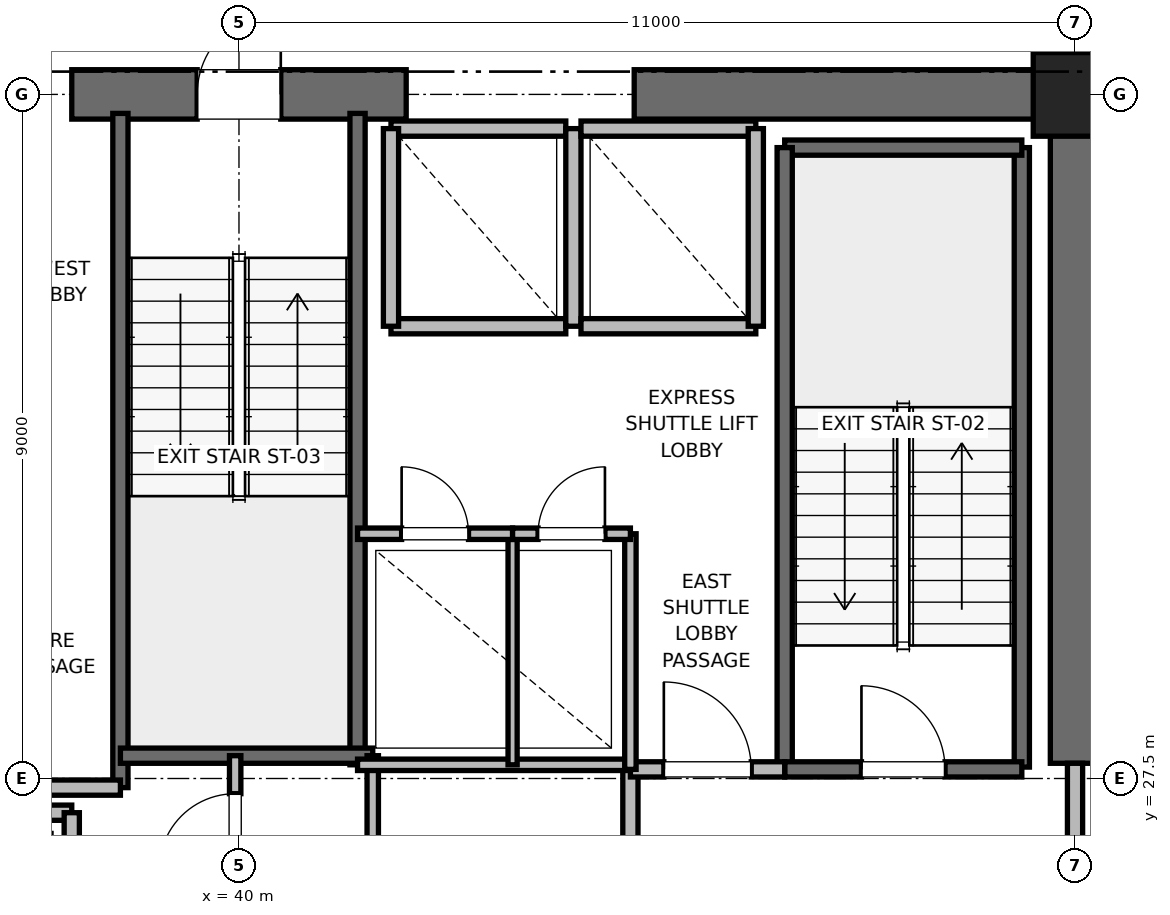
"""IFC4 building model, lengths in metres.
Left out: names, types, materials, properties, quantities, classifications, styles, units other than length and angle.
Written with IfcOpenShell. Run it as: python <this file> out.ifc"""

import sys

from ifc_helpers import new_model, si_unit, direction, frame, frame_2d, origin, origin_2d, place, context, subcontext, project, spatial, rectangle, extrude, element, fill, save


model = new_model("IFC4")
c1 = context("Model", 3, precision=1e-05, world=origin(), true_north=direction((0.0, 1.0)))
c2 = subcontext(c1, "Body", "Model", "MODEL_VIEW")
j1 = project(units=[si_unit("LENGTHUNIT", "METRE"), si_unit("PLANEANGLEUNIT", "RADIAN")], contexts=[c1])
p1 = place(None, origin())
s1 = spatial("IfcSite", under=j1, at=p1, CompositionType="ELEMENT")
p2 = place(p1, origin())
s2 = spatial("IfcBuilding", under=s1, at=p2, CompositionType="ELEMENT")
p3 = place(p2, frame((0.0, 0.0, 27.6)))
s3 = spatial("IfcBuildingStorey", under=s2, at=p3, CompositionType="ELEMENT", Elevation=27.6)
p4 = place(p3, frame((51.0, 36.5, 0.0), z_axis=(0.0, 0.0, 1.0), x_axis=(1.0, 0.0, 0.0)))
e1 = element("IfcColumn", 1, at=p4, inside=s3, PredefinedType="PILASTER", context=c2, shape_type="SweptSolid", body=[
    extrude(rectangle(XDim=1.1, YDim=1.1, at=origin_2d()), origin(), (0.0, 0.0, 1.0), 4.0),
])
p5 = place(p3, frame((37.8, 36.5, 0.0), z_axis=(0.0, 0.0, 1.0), x_axis=(1.0, 0.0, 0.0)))
e2 = element("IfcWall", 2, at=p5, inside=s3, PredefinedType="SHEAR", context=c2, shape_type="SweptSolid", body=[
    extrude(rectangle(XDim=4.4, YDim=0.65, at=frame_2d((2.2, 0.0))), origin(), (0.0, 0.0, 1.0), 3.76),
])
p6 = place(p5, frame((1.65, 0.0, 0.0)))
e3 = element("IfcOpeningElement", 3, at=p6, cuts=e2, PredefinedType="OPENING", context=c2, shape_type="SweptSolid", body=[
    extrude(rectangle(XDim=1.1, YDim=2.15, at=frame_2d((0.55, 1.075))), frame((0.0, 0.325, 0.0), z_axis=(0.0, -1.0, 0.0), x_axis=(1.0, 0.0, 0.0)), (0.0, 0.0, 1.0), 0.65),
])
p7 = place(p3, frame((45.2, 36.5, 0.0), z_axis=(0.0, 0.0, 1.0), x_axis=(1.0, 0.0, 0.0)))
e4 = element("IfcWall", 4, at=p7, inside=s3, PredefinedType="SHEAR", context=c2, shape_type="SweptSolid", body=[
    extrude(rectangle(XDim=5.8, YDim=0.65, at=frame_2d((2.9, 0.0))), origin(), (0.0, 0.0, 1.0), 3.76),
])
p8 = place(p3, frame((51.0, 27.7, 0.0), z_axis=(0.0, 0.0, 1.0), x_axis=(0.0, 1.0, 0.0)))
e5 = element("IfcWall", 5, at=p8, inside=s3, PredefinedType="SHEAR", context=c2, shape_type="SweptSolid", body=[
    extrude(rectangle(XDim=8.8, YDim=0.65, at=frame_2d((4.4, 0.0))), origin(), (0.0, 0.0, 1.0), 3.76),
])
p9 = place(p3, frame((50.3, 27.65, 0.0), z_axis=(0.0, 0.0, 1.0), x_axis=(0.0, 1.0, 0.0)))
e6 = element("IfcWall", 6, at=p9, inside=s3, PredefinedType="SOLIDWALL", context=c2, shape_type="SweptSolid", body=[
    extrude(rectangle(XDim=8.15, YDim=0.2, at=frame_2d((4.075, 0.0))), origin(), (0.0, 0.0, 1.0), 3.76),
])
p10 = place(p3, frame((47.18, 35.8, 0.0), z_axis=(0.0, 0.0, 1.0), x_axis=(1.0, 0.0, 0.0)))
e7 = element("IfcWall", 7, at=p10, inside=s3, PredefinedType="SOLIDWALL", context=c2, shape_type="SweptSolid", body=[
    extrude(rectangle(XDim=3.12, YDim=0.2, at=frame_2d((1.56, 0.0))), origin(), (0.0, 0.0, 1.0), 3.76),
])
p11 = place(p3, frame((47.18, 27.62, 0.0), z_axis=(0.0, 0.0, 1.0), x_axis=(0.0, 1.0, 0.0)))
e8 = element("IfcWall", 8, at=p11, inside=s3, PredefinedType="SOLIDWALL", context=c2, shape_type="SweptSolid", body=[
    extrude(rectangle(XDim=8.18, YDim=0.2, at=frame_2d((4.09, 0.0))), origin(), (0.0, 0.0, 1.0), 3.76),
])
p12 = place(p3, frame((47.18, 27.62, 0.0), z_axis=(0.0, 0.0, 1.0), x_axis=(1.0, 0.0, 0.0)))
e9 = element("IfcWall", 9, at=p12, inside=s3, PredefinedType="SOLIDWALL", context=c2, shape_type="SweptSolid", body=[
    extrude(rectangle(XDim=3.12, YDim=0.2, at=frame_2d((1.56, 0.0))), origin(), (0.0, 0.0, 1.0), 3.76),
])
p13 = place(p12, frame((1.01, 0.0, 0.0)))
e10 = element("IfcOpeningElement", 10, at=p13, cuts=e9, PredefinedType="OPENING", context=c2, shape_type="SweptSolid", body=[
    extrude(rectangle(XDim=1.1, YDim=2.15, at=frame_2d((0.55, 1.075))), frame((0.0, 0.1, 0.0), z_axis=(0.0, -1.0, 0.0), x_axis=(1.0, 0.0, 0.0)), (0.0, 0.0, 1.0), 0.2),
])
p14 = place(p3, frame((38.44, 27.38, 0.0), z_axis=(0.0, 0.0, 1.0), x_axis=(0.0, 1.0, 0.0)))
e11 = element("IfcWall", 11, at=p14, inside=s3, PredefinedType="SOLIDWALL", context=c2, shape_type="SweptSolid", body=[
    extrude(rectangle(XDim=8.87, YDim=0.2, at=frame_2d((4.435, 0.0))), origin(), (0.0, 0.0, 1.0), 3.76),
])
p15 = place(p3, frame((41.56, 27.68, 0.0), z_axis=(0.0, 0.0, 1.0), x_axis=(0.0, 1.0, 0.0)))
e12 = element("IfcWall", 12, at=p15, inside=s3, PredefinedType="SOLIDWALL", context=c2, shape_type="SweptSolid", body=[
    extrude(rectangle(XDim=8.57, YDim=0.2, at=frame_2d((4.285, 0.0))), origin(), (0.0, 0.0, 1.0), 3.76),
])
p16 = place(p3, frame((38.44, 27.8, 0.0), z_axis=(0.0, 0.0, 1.0), x_axis=(1.0, 0.0, 0.0)))
e13 = element("IfcWall", 13, at=p16, inside=s3, PredefinedType="SOLIDWALL", context=c2, shape_type="SweptSolid", body=[
    extrude(rectangle(XDim=3.32, YDim=0.2, at=frame_2d((1.66, 0.0))), origin(), (0.0, 0.0, 1.0), 3.76),
])
p17 = place(p3, frame((32.82, 27.38, 0.0), z_axis=(0.0, 0.0, 1.0), x_axis=(1.0, 0.0, 0.0)))
e14 = element("IfcWall", 14, at=p17, inside=s3, PredefinedType="PARTITIONING", context=c2, shape_type="SweptSolid", body=[
    extrude(rectangle(XDim=5.62, YDim=0.2, at=frame_2d((2.81, 0.0))), origin(), (0.0, 0.0, 1.0), 3.76),
])
p18 = place(p3, frame((45.15, 24.25, 0.0), z_axis=(0.0, 0.0, 1.0), x_axis=(0.0, 1.0, 0.0)))
e15 = element("IfcWall", 15, at=p18, inside=s3, PredefinedType="PARTITIONING", context=c2, shape_type="SweptSolid", body=[
    extrude(rectangle(XDim=3.37, YDim=0.2, at=frame_2d((1.685, 0.0))), origin(), (0.0, 0.0, 1.0), 3.76),
])
p19 = place(p3, frame((45.15, 27.62, 0.0), z_axis=(0.0, 0.0, 1.0), x_axis=(1.0, 0.0, 0.0)))
e16 = element("IfcWall", 16, at=p19, inside=s3, PredefinedType="PARTITIONING", context=c2, shape_type="SweptSolid", body=[
    extrude(rectangle(XDim=2.03, YDim=0.2, at=frame_2d((1.015, 0.0))), origin(), (0.0, 0.0, 1.0), 3.76),
])
p20 = place(p19, frame((0.44, 0.0, 0.0)))
e17 = element("IfcOpeningElement", 17, at=p20, cuts=e16, PredefinedType="OPENING", context=c2, shape_type="SweptSolid", body=[
    extrude(rectangle(XDim=1.15, YDim=2.2, at=frame_2d((0.575, 1.1))), frame((0.0, 0.1, 0.0), z_axis=(0.0, -1.0, 0.0), x_axis=(1.0, 0.0, 0.0)), (0.0, 0.0, 1.0), 0.2),
])
p21 = place(p3, frame((51.0, 24.3, 0.0), z_axis=(0.0, 0.0, 1.0), x_axis=(0.0, 1.0, 0.0)))
e18 = element("IfcWall", 18, at=p21, inside=s3, PredefinedType="PARTITIONING", context=c2, shape_type="SweptSolid", body=[
    extrude(rectangle(XDim=3.4, YDim=0.2, at=frame_2d((1.7, 0.0))), origin(), (0.0, 0.0, 1.0), 2.54),
])
p22 = place(p21, frame((1.125, 0.0, 0.0)))
e19 = element("IfcOpeningElement", 19, at=p22, cuts=e18, PredefinedType="OPENING", context=c2, shape_type="SweptSolid", body=[
    extrude(rectangle(XDim=1.15, YDim=2.2, at=frame_2d((0.575, 1.1))), frame((0.0, 0.1, 0.0), z_axis=(0.0, -1.0, 0.0), x_axis=(1.0, 0.0, 0.0)), (0.0, 0.0, 1.0), 0.2),
])
p23 = place(p3, frame((37.8, 27.05, 0.0), z_axis=(0.0, 0.0, 1.0), x_axis=(-1.0, 0.0, 0.0)))
e20 = element("IfcWall", 20, at=p23, inside=s3, PredefinedType="SOLIDWALL", context=c2, shape_type="SweptSolid", body=[
    extrude(rectangle(XDim=2.3, YDim=0.2, at=frame_2d((1.15, 0.0))), origin(), (0.0, 0.0, 1.0), 3.76),
])
p24 = place(p3, frame((37.8, 24.45, 0.0), z_axis=(0.0, 0.0, 1.0), x_axis=(0.0, 1.0, 0.0)))
e21 = element("IfcWall", 21, at=p24, inside=s3, PredefinedType="SOLIDWALL", context=c2, shape_type="SweptSolid", body=[
    extrude(rectangle(XDim=2.6, YDim=0.2, at=frame_2d((1.3, 0.0))), origin(), (0.0, 0.0, 1.0), 3.76),
])
p25 = place(p3, frame((42.0, 33.45, 0.0), z_axis=(0.0, 0.0, 1.0), x_axis=(1.0, 0.0, 0.0)))
e22 = element("IfcWall", 22, at=p25, inside=s3, PredefinedType="SOLIDWALL", context=c2, shape_type="SweptSolid", body=[
    extrude(rectangle(XDim=2.3, YDim=0.2, at=frame_2d((1.15, 0.0))), origin(), (0.0, 0.0, 1.0), 3.76),
])
p26 = place(p3, frame((44.3, 36.05, 0.0), z_axis=(0.0, 0.0, 1.0), x_axis=(-1.0, 0.0, 0.0)))
e23 = element("IfcWall", 23, at=p26, inside=s3, PredefinedType="SOLIDWALL", context=c2, shape_type="SweptSolid", body=[
    extrude(rectangle(XDim=2.3, YDim=0.2, at=frame_2d((1.15, 0.0))), origin(), (0.0, 0.0, 1.0), 2.54),
])
for number, where, z_axis, x_axis in (
    (24, (42.0, 36.05, 0.0), (0.0, 0.0, 1.0), (0.0, -1.0, 0.0)),
    (25, (44.4, 33.45, 0.0), (0.0, 0.0, 1.0), (0.0, 1.0, 0.0)),
):
    element("IfcWall", number, at=place(p3, frame(where, z_axis=z_axis, x_axis=x_axis)), inside=s3, PredefinedType="SOLIDWALL", context=c2, shape_type="SweptSolid", body=[
        extrude(rectangle(XDim=2.6, YDim=0.2, at=frame_2d((1.3, 0.0))), origin(), (0.0, 0.0, 1.0), 2.54),
    ])
p27 = place(p3, frame((44.5, 33.45, 0.0), z_axis=(0.0, 0.0, 1.0), x_axis=(1.0, 0.0, 0.0)))
e26 = element("IfcWall", 26, at=p27, inside=s3, PredefinedType="SOLIDWALL", context=c2, shape_type="SweptSolid", body=[
    extrude(rectangle(XDim=2.3, YDim=0.2, at=frame_2d((1.15, 0.0))), origin(), (0.0, 0.0, 1.0), 3.76),
])
p28 = place(p3, frame((46.8, 36.05, 0.0), z_axis=(0.0, 0.0, 1.0), x_axis=(-1.0, 0.0, 0.0)))
e27 = element("IfcWall", 27, at=p28, inside=s3, PredefinedType="SOLIDWALL", context=c2, shape_type="SweptSolid", body=[
    extrude(rectangle(XDim=2.3, YDim=0.2, at=frame_2d((1.15, 0.0))), origin(), (0.0, 0.0, 1.0), 2.54),
])
p29 = place(p3, frame((46.8, 33.45, 0.0), z_axis=(0.0, 0.0, 1.0), x_axis=(0.0, 1.0, 0.0)))
e28 = element("IfcWall", 28, at=p29, inside=s3, PredefinedType="SOLIDWALL", context=c2, shape_type="SweptSolid", body=[
    extrude(rectangle(XDim=2.6, YDim=0.2, at=frame_2d((1.3, 0.0))), origin(), (0.0, 0.0, 1.0), 3.76),
])
p30 = place(p3, frame((41.76, 23.8, 0.0), z_axis=(0.0, 0.0, 1.0), x_axis=(0.0, 1.0, 0.0)))
e29 = element("IfcWall", 29, at=p30, inside=s3, PredefinedType="PARTITIONING", context=c2, shape_type="SweptSolid", body=[
    extrude(rectangle(XDim=4.0, YDim=0.15, at=frame_2d((2.0, 0.0))), origin(), (0.0, 0.0, 1.0), 2.85),
])
p31 = place(p3, frame((39.95, 25.8, 0.0), z_axis=(0.0, 0.0, 1.0), x_axis=(0.0, 1.0, 0.0)))
e30 = element("IfcWall", 30, at=p31, inside=s3, PredefinedType="PARTITIONING", context=c2, shape_type="SweptSolid", body=[
    extrude(rectangle(XDim=2.0, YDim=0.15, at=frame_2d((1.0, 0.0))), origin(), (0.0, 0.0, 1.0), 2.85),
])
p32 = place(p31, frame((0.5, 0.0, 0.0)))
e31 = element("IfcOpeningElement", 31, at=p32, cuts=e30, PredefinedType="OPENING", context=c2, shape_type="SweptSolid", body=[
    extrude(rectangle(XDim=1.0, YDim=2.15, at=frame_2d((0.5, 1.075))), frame((0.0, 0.075, 0.0), z_axis=(0.0, -1.0, 0.0), x_axis=(1.0, 0.0, 0.0)), (0.0, 0.0, 1.0), 0.15),
])
p33 = place(p3, frame((41.56, 27.68, 0.0), z_axis=(0.0, 0.0, 1.0), x_axis=(1.0, 0.0, 0.0)))
e32 = element("IfcWall", 32, at=p33, inside=s3, PredefinedType="PARTITIONING", context=c2, shape_type="SweptSolid", body=[
    extrude(rectangle(XDim=3.59, YDim=0.15, at=frame_2d((1.795, 0.0))), origin(), (0.0, 0.0, 1.0), 2.85),
])
p34 = place(p3, frame((45.15, 27.62, 0.0), z_axis=(0.0, 0.0, 1.0), x_axis=(0.0, 1.0, 0.0)))
e33 = element("IfcWall", 33, at=p34, inside=s3, PredefinedType="PARTITIONING", context=c2, shape_type="SweptSolid", body=[
    extrude(rectangle(XDim=3.1, YDim=0.15, at=frame_2d((1.55, 0.0))), origin(), (0.0, 0.0, 1.0), 2.85),
])
p35 = place(p3, frame((43.6, 27.68, 0.0), z_axis=(0.0, 0.0, 1.0), x_axis=(0.0, 1.0, 0.0)))
e34 = element("IfcWall", 34, at=p35, inside=s3, PredefinedType="PARTITIONING", context=c2, shape_type="SweptSolid", body=[
    extrude(rectangle(XDim=3.04, YDim=0.12, at=frame_2d((1.52, 0.0))), origin(), (0.0, 0.0, 1.0), 2.85),
])
p36 = place(p3, frame((41.56, 30.72, 0.0), z_axis=(0.0, 0.0, 1.0), x_axis=(1.0, 0.0, 0.0)))
e35 = element("IfcWall", 35, at=p36, inside=s3, PredefinedType="PARTITIONING", context=c2, shape_type="SweptSolid", body=[
    extrude(rectangle(XDim=2.04, YDim=0.15, at=frame_2d((1.02, 0.0))), origin(), (0.0, 0.0, 1.0), 2.85),
])
p37 = place(p36, frame((0.58, 0.0, 0.0)))
e36 = element("IfcOpeningElement", 36, at=p37, cuts=e35, PredefinedType="OPENING", context=c2, shape_type="SweptSolid", body=[
    extrude(rectangle(XDim=0.88, YDim=2.1, at=frame_2d((0.44, 1.05))), frame((0.0, 0.075, 0.0), z_axis=(0.0, -1.0, 0.0), x_axis=(1.0, 0.0, 0.0)), (0.0, 0.0, 1.0), 0.15),
])
p38 = place(p3, frame((43.6, 30.72, 0.0), z_axis=(0.0, 0.0, 1.0), x_axis=(1.0, 0.0, 0.0)))
e37 = element("IfcWall", 37, at=p38, inside=s3, PredefinedType="PARTITIONING", context=c2, shape_type="SweptSolid", body=[
    extrude(rectangle(XDim=1.55, YDim=0.15, at=frame_2d((0.775, 0.0))), origin(), (0.0, 0.0, 1.0), 2.85),
])
p39 = place(p38, frame((0.335, 0.0, 0.0)))
e38 = element("IfcOpeningElement", 38, at=p39, cuts=e37, PredefinedType="OPENING", context=c2, shape_type="SweptSolid", body=[
    extrude(rectangle(XDim=0.88, YDim=2.1, at=frame_2d((0.44, 1.05))), frame((0.0, 0.075, 0.0), z_axis=(0.0, -1.0, 0.0), x_axis=(1.0, 0.0, 0.0)), (0.0, 0.0, 1.0), 0.15),
])
p40 = place(p13, origin())
e39 = element("IfcDoor", 39, at=p40, inside=s3, OperationType="SINGLE_SWING_LEFT", PredefinedType="DOOR", context=c2, shape_type="SweptSolid", body=[
    extrude(rectangle(XDim=1.1, YDim=2.15, at=frame_2d((0.55, 1.075))), frame((0.0, 0.025, 0.0), z_axis=(0.0, -1.0, 0.0), x_axis=(1.0, 0.0, 0.0)), (0.0, 0.0, 1.0), 0.05),
])
fill(e10, e39)
p41 = place(p6, origin())
e40 = element("IfcDoor", 40, at=p41, inside=s3, OperationType="SINGLE_SWING_RIGHT", PredefinedType="DOOR", context=c2, shape_type="SweptSolid", body=[
    extrude(rectangle(XDim=1.1, YDim=2.15, at=frame_2d((0.55, 1.075))), frame((0.0, 0.025, 0.0), z_axis=(0.0, -1.0, 0.0), x_axis=(1.0, 0.0, 0.0)), (0.0, 0.0, 1.0), 0.05),
])
fill(e3, e40)
p42 = place(p20, origin())
e41 = element("IfcDoor", 41, at=p42, inside=s3, OperationType="SINGLE_SWING_LEFT", PredefinedType="DOOR", context=c2, shape_type="SweptSolid", body=[
    extrude(rectangle(XDim=1.15, YDim=2.2, at=frame_2d((0.575, 1.1))), frame((0.0, 0.025, 0.0), z_axis=(0.0, -1.0, 0.0), x_axis=(1.0, 0.0, 0.0)), (0.0, 0.0, 1.0), 0.05),
])
fill(e17, e41)
p43 = place(p32, origin())
e42 = element("IfcDoor", 42, at=p43, inside=s3, OperationType="SINGLE_SWING_LEFT", PredefinedType="DOOR", context=c2, shape_type="SweptSolid", body=[
    extrude(rectangle(XDim=1.0, YDim=2.15, at=frame_2d((0.5, 1.075))), frame((0.0, 0.025, 0.0), z_axis=(0.0, -1.0, 0.0), x_axis=(1.0, 0.0, 0.0)), (0.0, 0.0, 1.0), 0.05),
])
fill(e31, e42)
p44 = place(p37, origin())
e43 = element("IfcDoor", 43, at=p44, inside=s3, OperationType="SINGLE_SWING_LEFT", PredefinedType="DOOR", context=c2, shape_type="SweptSolid", body=[
    extrude(rectangle(XDim=0.88, YDim=2.1, at=frame_2d((0.44, 1.05))), frame((0.0, 0.025, 0.0), z_axis=(0.0, -1.0, 0.0), x_axis=(1.0, 0.0, 0.0)), (0.0, 0.0, 1.0), 0.05),
])
fill(e36, e43)
p45 = place(p39, origin())
e44 = element("IfcDoor", 44, at=p45, inside=s3, OperationType="SINGLE_SWING_RIGHT", PredefinedType="DOOR", context=c2, shape_type="SweptSolid", body=[
    extrude(rectangle(XDim=0.88, YDim=2.1, at=frame_2d((0.44, 1.05))), frame((0.0, 0.025, 0.0), z_axis=(0.0, -1.0, 0.0), x_axis=(1.0, 0.0, 0.0)), (0.0, 0.0, 1.0), 0.05),
])
fill(e38, e44)
save(model, sys.argv[1])
